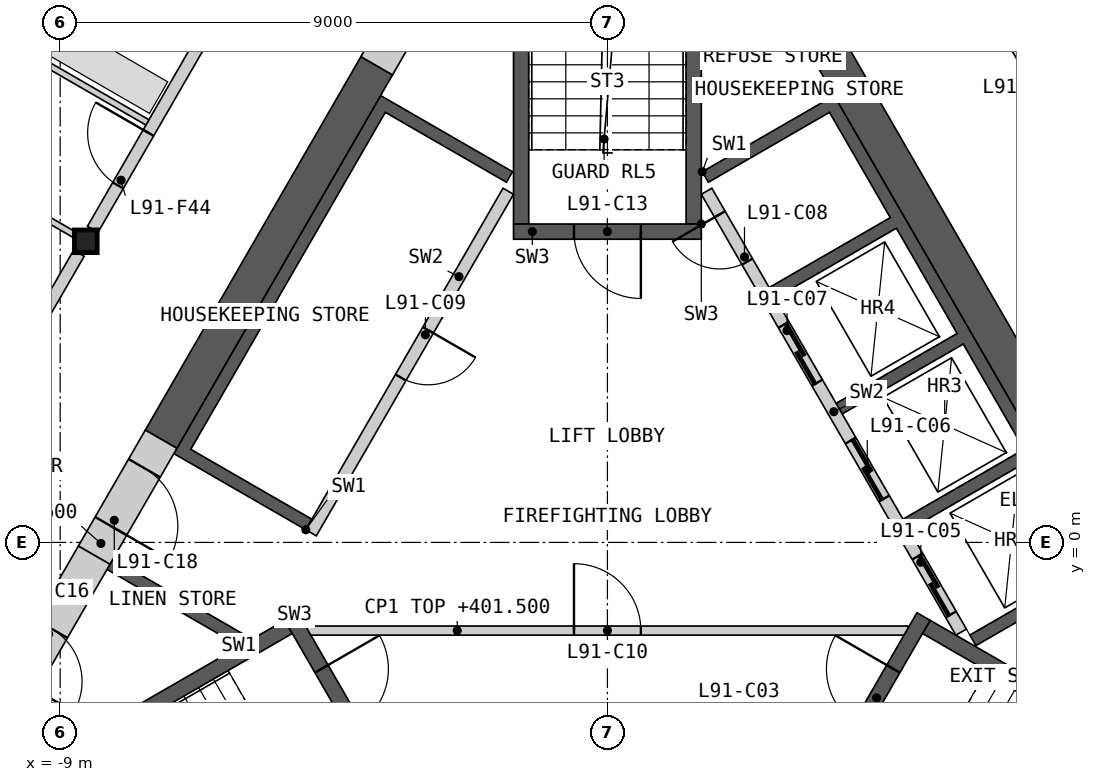
"""IFC4 building model, lengths in metres.
Left out: names, types, materials, properties, quantities, classifications, styles, units other than length and angle.
Written with IfcOpenShell. Run it as: python <this file> out.ifc"""

import sys

from ifc_helpers import new_model, si_unit, direction, frame, frame_2d, origin, origin_2d, place, context, subcontext, project, spatial, polyline, rectangle, i_section, outline, extrude, element, fill, save


model = new_model("IFC4")
c1 = context("Model", 3, precision=1e-05, world=origin(), true_north=direction((0.0, 1.0)))
c2 = subcontext(c1, "Body", "Model", "MODEL_VIEW")
j1 = project(units=[si_unit("LENGTHUNIT", "METRE"), si_unit("PLANEANGLEUNIT", "RADIAN")], contexts=[c1])
p1 = place(None, origin())
s1 = spatial("IfcSite", under=j1, at=p1, CompositionType="ELEMENT")
p2 = place(p1, origin())
s2 = spatial("IfcBuilding", under=s1, at=p2, CompositionType="ELEMENT")
p3 = place(p2, frame((0.0, 0.0, 398.4)))
s3 = spatial("IfcBuildingStorey", under=s2, at=p3, CompositionType="ELEMENT", Elevation=398.4)
p4 = place(p3, frame((-8.578, 4.953, 0.0), z_axis=(0.0, 0.0, 1.0), x_axis=(1.0, 0.0, 0.0)))
e1 = element("IfcColumn", 1, at=p4, inside=s3, PredefinedType="COLUMN", context=c2, shape_type="SweptSolid", body=[
    extrude(i_section(OverallWidth=0.374, OverallDepth=0.372, WebThickness=0.016, FlangeThickness=0.026, at=origin_2d()), origin(), (0.0, 0.0, 1.0), 3.4),
])
p5 = place(p3, origin())
e2 = element("IfcWall", 2, at=p5, inside=s3, PredefinedType="SHEAR", context=c2, shape_type="SweptSolid", body=[
    extrude(outline(polyline([(1.561, 6.097), (3.731, 7.35), (8.231, -0.444), (6.061, -1.697), (5.96, -1.524), (7.952, -0.374), (6.952, 1.358), (4.96, 0.208), (4.861, 0.381), (6.852, 1.531), (5.852, 3.263), (3.861, 2.113), (3.76, 2.287), (5.752, 3.437), (4.752, 5.169), (2.76, 4.019), (2.66, 4.192), (4.652, 5.342), (3.652, 7.074), (1.66, 5.924), (1.561, 6.097)])), origin(), (0.0, 0.0, 1.0), 3.1),
])
p6 = place(p3, frame((5.817, -1.476, 0.0), z_axis=(0.0, 0.0, 1.0), x_axis=(-0.500002616675, 0.866023893041, 0.0)))
e3 = element("IfcWall", 3, at=p6, inside=s3, PredefinedType="SOLIDWALL", context=c2, shape_type="SweptSolid", body=[
    extrude(rectangle(XDim=8.373, YDim=0.2, at=frame_2d((4.187, 0.0))), origin(), (0.0, 0.0, 1.0), 3.1),
])
p7 = place(p6, frame((0.337, 0.0, 0.0)))
e4 = element("IfcOpeningElement", 4, at=p7, cuts=e3, PredefinedType="OPENING", context=c2, shape_type="SweptSolid", body=[
    extrude(rectangle(XDim=1.1, YDim=2.1, at=frame_2d((0.55, 1.05))), frame((0.0, 0.11, 0.0), z_axis=(0.0, -1.0, 0.0), x_axis=(1.0, 0.0, 0.0)), (0.0, 0.0, 1.0), 0.22),
])
p8 = place(p6, frame((2.537, 0.0, 0.0)))
e5 = element("IfcOpeningElement", 5, at=p8, cuts=e3, PredefinedType="OPENING", context=c2, shape_type="SweptSolid", body=[
    extrude(rectangle(XDim=1.1, YDim=2.1, at=frame_2d((0.55, 1.05))), frame((0.0, 0.11, 0.0), z_axis=(0.0, -1.0, 0.0), x_axis=(1.0, 0.0, 0.0)), (0.0, 0.0, 1.0), 0.22),
])
p9 = place(p6, frame((4.737, 0.0, 0.0)))
e6 = element("IfcOpeningElement", 6, at=p9, cuts=e3, PredefinedType="OPENING", context=c2, shape_type="SweptSolid", body=[
    extrude(rectangle(XDim=1.1, YDim=2.1, at=frame_2d((0.55, 1.05))), frame((0.0, 0.11, 0.0), z_axis=(0.0, -1.0, 0.0), x_axis=(1.0, 0.0, 0.0)), (0.0, 0.0, 1.0), 0.22),
])
p10 = place(p6, frame((7.037, 0.0, 0.0)))
e7 = element("IfcOpeningElement", 7, at=p10, cuts=e3, PredefinedType="OPENING", context=c2, shape_type="SweptSolid", body=[
    extrude(rectangle(XDim=0.9, YDim=2.1, at=frame_2d((0.45, 1.05))), frame((0.0, 0.11, 0.0), z_axis=(0.0, -1.0, 0.0), x_axis=(1.0, 0.0, 0.0)), (0.0, 0.0, 1.0), 0.22),
])
p11 = place(p3, origin())
e8 = element("IfcWall", 8, at=p11, inside=s3, PredefinedType="SHEAR", context=c2, shape_type="SweptSolid", body=[
    extrude(outline(polyline([(-6.061, -1.697), (-8.231, -0.444), (-8.131, -0.271), (-5.96, -1.524), (-6.061, -1.697)])), origin(), (0.0, 0.0, 1.0), 3.1),
])
p12 = place(p3, origin())
e9 = element("IfcWall", 9, at=p12, inside=s3, PredefinedType="SHEAR", context=c2, shape_type="SweptSolid", body=[
    extrude(outline(polyline([(-4.96, 0.208), (-7.131, 1.461), (-3.731, 7.35), (-1.561, 6.097), (-1.66, 5.924), (-3.652, 7.074), (-6.852, 1.531), (-4.861, 0.381), (-4.96, 0.208)])), origin(), (0.0, 0.0, 1.0), 3.1),
])
p13 = place(p3, frame((-1.631, 5.776, 0.0), z_axis=(0.0, 0.0, 1.0), x_axis=(-0.499992876559, -0.866029516466, 0.0)))
e10 = element("IfcWall", 10, at=p13, inside=s3, PredefinedType="SOLIDWALL", context=c2, shape_type="SweptSolid", body=[
    extrude(rectangle(XDim=6.486, YDim=0.2, at=frame_2d((3.243, 0.0))), origin(), (0.0, 0.0, 1.0), 3.1),
])
p14 = place(p13, frame((2.637, 0.0, 0.0)))
e11 = element("IfcOpeningElement", 11, at=p14, cuts=e10, PredefinedType="OPENING", context=c2, shape_type="SweptSolid", body=[
    extrude(rectangle(XDim=0.9, YDim=2.1, at=frame_2d((0.45, 1.05))), frame((0.0, 0.11, 0.0), z_axis=(0.0, -1.0, 0.0), x_axis=(1.0, 0.0, 0.0)), (0.0, 0.0, 1.0), 0.22),
])
p15 = place(p3, frame((-4.941, -1.45, 0.0), z_axis=(0.0, 0.0, 1.0), x_axis=(1.0, 0.0, 0.0)))
e12 = element("IfcWall", 12, at=p15, inside=s3, PredefinedType="PARTITIONING", context=c2, shape_type="SweptSolid", body=[
    extrude(rectangle(XDim=9.882, YDim=0.15, at=frame_2d((4.941, 0.0))), origin(), (0.0, 0.0, 1.0), 3.1),
])
p16 = place(p15, frame((4.391, 0.0, 0.0)))
e13 = element("IfcOpeningElement", 13, at=p16, cuts=e12, PredefinedType="OPENING", context=c2, shape_type="SweptSolid", body=[
    extrude(rectangle(XDim=1.1, YDim=2.1, at=frame_2d((0.55, 1.05))), frame((0.0, 0.085, 0.0), z_axis=(0.0, -1.0, 0.0), x_axis=(1.0, 0.0, 0.0)), (0.0, 0.0, 1.0), 0.17),
])
p17 = place(p3, origin())
e14 = element("IfcWall", 14, at=p17, inside=s3, PredefinedType="SHEAR", context=c2, shape_type="SweptSolid", body=[
    extrude(outline(polyline([(-5.307, -1.281), (-10.374, -4.206), (-10.032, -4.298), (-5.182, -1.498), (-5.307, -1.281)])), origin(), (0.0, 0.0, 1.0), 3.1),
])
p18 = place(p3, frame((-5.199, -1.219, 0.0), z_axis=(0.0, 0.0, 1.0), x_axis=(0.499982516597, -0.866035497597, 0.0)))
e15 = element("IfcWall", 15, at=p18, inside=s3, PredefinedType="SHEAR", context=c2, shape_type="SweptSolid", body=[
    extrude(rectangle(XDim=3.088, YDim=0.25, at=frame_2d((1.544, 0.0))), origin(), (0.0, 0.0, 1.0), 3.1),
])
p19 = place(p18, frame((0.994, 0.0, 0.0)))
e16 = element("IfcOpeningElement", 16, at=p19, cuts=e15, PredefinedType="OPENING", context=c2, shape_type="SweptSolid", body=[
    extrude(rectangle(XDim=1.1, YDim=2.1, at=frame_2d((0.55, 1.05))), frame((0.0, 0.135, 0.0), z_axis=(0.0, -1.0, 0.0), x_axis=(1.0, 0.0, 0.0)), (0.0, 0.0, 1.0), 0.27),
])
p20 = place(p3, origin())
e17 = element("IfcWall", 17, at=p20, inside=s3, PredefinedType="SHEAR", context=c2, shape_type="SweptSolid", body=[
    extrude(outline(polyline([(10.032, -4.298), (10.374, -4.206), (5.307, -1.281), (5.182, -1.498), (10.032, -4.298)])), origin(), (0.0, 0.0, 1.0), 3.1),
])
p21 = place(p3, frame((3.655, -3.893, 0.0), z_axis=(0.0, 0.0, 1.0), x_axis=(0.499982516597, 0.866035497597, 0.0)))
e18 = element("IfcWall", 18, at=p21, inside=s3, PredefinedType="SHEAR", context=c2, shape_type="SweptSolid", body=[
    extrude(rectangle(XDim=3.088, YDim=0.25, at=frame_2d((1.544, 0.0))), origin(), (0.0, 0.0, 1.0), 3.1),
])
p22 = place(p21, frame((0.994, 0.0, 0.0)))
e19 = element("IfcOpeningElement", 19, at=p22, cuts=e18, PredefinedType="OPENING", context=c2, shape_type="SweptSolid", body=[
    extrude(rectangle(XDim=1.1, YDim=2.1, at=frame_2d((0.55, 1.05))), frame((0.0, 0.135, 0.0), z_axis=(0.0, -1.0, 0.0), x_axis=(1.0, 0.0, 0.0)), (0.0, 0.0, 1.0), 0.27),
])
p23 = place(p3, origin())
e20 = element("IfcWall", 20, at=p23, inside=s3, PredefinedType="SHEAR", context=c2, shape_type="SweptSolid", body=[
    extrude(outline(polyline([(1.544, 5.237), (1.544, 11.087), (1.294, 10.837), (1.294, 5.237), (1.544, 5.237)])), origin(), (0.0, 0.0, 1.0), 3.1),
])
p24 = place(p3, origin())
e21 = element("IfcWall", 21, at=p24, inside=s3, PredefinedType="SHEAR", context=c2, shape_type="SweptSolid", body=[
    extrude(outline(polyline([(-1.294, 10.837), (-1.544, 11.087), (-1.544, 5.237), (-1.294, 5.237), (-1.294, 10.837)])), origin(), (0.0, 0.0, 1.0), 3.1),
])
p25 = place(p3, frame((1.544, 5.112, 0.0), z_axis=(0.0, 0.0, 1.0), x_axis=(-1.0, 0.0, 0.0)))
e22 = element("IfcWall", 22, at=p25, inside=s3, PredefinedType="SHEAR", context=c2, shape_type="SweptSolid", body=[
    extrude(rectangle(XDim=3.088, YDim=0.25, at=frame_2d((1.544, 0.0))), origin(), (0.0, 0.0, 1.0), 3.1),
])
p26 = place(p25, frame((0.994, 0.0, 0.0)))
e23 = element("IfcOpeningElement", 23, at=p26, cuts=e22, PredefinedType="OPENING", context=c2, shape_type="SweptSolid", body=[
    extrude(rectangle(XDim=1.1, YDim=2.1, at=frame_2d((0.55, 1.05))), frame((0.0, 0.135, 0.0), z_axis=(0.0, -1.0, 0.0), x_axis=(1.0, 0.0, 0.0)), (0.0, 0.0, 1.0), 0.27),
])
p27 = place(p3, frame((8.686, -0.634, 0.0), z_axis=(0.0, 0.0, 1.0), x_axis=(-0.500004601921, 0.866022746848, 0.0)))
e24 = element("IfcWall", 24, at=p27, inside=s3, PredefinedType="SHEAR", context=c2, shape_type="SweptSolid", body=[
    extrude(rectangle(XDim=16.853, YDim=0.6, at=frame_2d((8.426, 0.0))), origin(), (0.0, 0.0, 1.0), 3.1),
])
p28 = place(p3, frame((-3.794, 7.84, 0.0), z_axis=(0.0, 0.0, 1.0), x_axis=(-0.499974747889, -0.866039982607, 0.0)))
e25 = element("IfcWall", 25, at=p28, inside=s3, PredefinedType="SHEAR", context=c2, shape_type="SweptSolid", body=[
    extrude(rectangle(XDim=7.092, YDim=0.6, at=frame_2d((3.546, 0.0))), origin(), (0.0, 0.0, 1.0), 3.1),
])
p29 = place(p3, frame((-8.44, -0.208, 0.0), z_axis=(0.0, 0.0, 1.0), x_axis=(-0.499997052475, -0.866027105532, 0.0)))
e26 = element("IfcWall", 26, at=p29, inside=s3, PredefinedType="SHEAR", context=c2, shape_type="SweptSolid", body=[
    extrude(rectangle(XDim=3.001, YDim=0.6, at=frame_2d((1.501, 0.0))), origin(), (0.0, 0.0, 1.0), 3.1),
])
p30 = place(p29, frame((1.4, 0.0, 0.0)))
e27 = element("IfcOpeningElement", 27, at=p30, cuts=e26, PredefinedType="OPENING", context=c2, shape_type="SweptSolid", body=[
    extrude(rectangle(XDim=1.0, YDim=2.1, at=frame_2d((0.5, 1.05))), frame((0.0, 0.31, 0.0), z_axis=(0.0, -1.0, 0.0), x_axis=(1.0, 0.0, 0.0)), (0.0, 0.0, 1.0), 0.62),
])
p31 = place(p3, frame((-2.694, 9.745, 0.0), z_axis=(0.0, 0.0, 1.0), x_axis=(-0.50002983664, -0.866008176907, 0.0)))
e28 = element("IfcWall", 28, at=p31, inside=s3, PredefinedType="SHEAR", context=c2, shape_type="SweptSolid", body=[
    extrude(rectangle(XDim=2.2, YDim=0.6, at=frame_2d((1.1, 0.0))), origin(), (0.0, 0.0, 1.0), 3.1),
])
p32 = place(p31, frame((0.6, 0.0, 0.0)))
e29 = element("IfcOpeningElement", 29, at=p32, cuts=e28, PredefinedType="OPENING", context=c2, shape_type="SweptSolid", body=[
    extrude(rectangle(XDim=1.0, YDim=2.1, at=frame_2d((0.5, 1.05))), frame((0.0, 0.31, 0.0), z_axis=(0.0, -1.0, 0.0), x_axis=(1.0, 0.0, 0.0)), (0.0, 0.0, 1.0), 0.62),
])
p33 = place(p3, frame((-7.34, 1.698, 0.0), z_axis=(0.0, 0.0, 1.0), x_axis=(-0.50002983664, -0.866008176907, 0.0)))
e30 = element("IfcWall", 30, at=p33, inside=s3, PredefinedType="SHEAR", context=c2, shape_type="SweptSolid", body=[
    extrude(rectangle(XDim=2.2, YDim=0.6, at=frame_2d((1.1, 0.0))), origin(), (0.0, 0.0, 1.0), 3.1),
])
p34 = place(p33, frame((0.55, 0.0, 0.0)))
e31 = element("IfcOpeningElement", 31, at=p34, cuts=e30, PredefinedType="OPENING", context=c2, shape_type="SweptSolid", body=[
    extrude(rectangle(XDim=1.1, YDim=2.1, at=frame_2d((0.55, 1.05))), frame((0.0, 0.31, 0.0), z_axis=(0.0, -1.0, 0.0), x_axis=(1.0, 0.0, 0.0)), (0.0, 0.0, 1.0), 0.62),
])
p35 = place(p3, frame((4.403, 12.185, 0.0), z_axis=(0.0, 0.0, 1.0), x_axis=(0.499992155518, -0.866029932751, 0.0)))
e32 = element("IfcWall", 32, at=p35, inside=s3, PredefinedType="PARTITIONING", context=c2, shape_type="SweptSolid", body=[
    extrude(rectangle(XDim=8.123, YDim=0.2, at=frame_2d((4.062, 0.0))), origin(), (0.0, 0.0, 1.0), 3.1),
])
p36 = place(p35, frame((3.963, 0.0, 0.0)))
e33 = element("IfcOpeningElement", 33, at=p36, cuts=e32, PredefinedType="OPENING", context=c2, shape_type="SweptSolid", body=[
    extrude(rectangle(XDim=1.0, YDim=2.1, at=frame_2d((0.5, 1.05))), frame((0.0, 0.11, 0.0), z_axis=(0.0, -1.0, 0.0), x_axis=(1.0, 0.0, 0.0)), (0.0, 0.0, 1.0), 0.22),
])
p37 = place(p35, frame((1.153, 0.0, 0.0)))
e34 = element("IfcOpeningElement", 34, at=p37, cuts=e32, PredefinedType="OPENING", context=c2, shape_type="SweptSolid", body=[
    extrude(rectangle(XDim=1.0, YDim=2.1, at=frame_2d((0.5, 1.05))), frame((0.0, 0.11, 0.0), z_axis=(0.0, -1.0, 0.0), x_axis=(1.0, 0.0, 0.0)), (0.0, 0.0, 1.0), 0.22),
])
p38 = place(p3, frame((-8.465, 5.15, 0.0), z_axis=(0.0, 0.0, 1.0), x_axis=(0.499992155518, 0.866029932751, 0.0)))
e35 = element("IfcWall", 35, at=p38, inside=s3, PredefinedType="PARTITIONING", context=c2, shape_type="SweptSolid", body=[
    extrude(rectangle(XDim=8.123, YDim=0.2, at=frame_2d((4.062, 0.0))), origin(), (0.0, 0.0, 1.0), 3.1),
])
p39 = place(p38, frame((5.97, 0.0, 0.0)))
e36 = element("IfcOpeningElement", 36, at=p39, cuts=e35, PredefinedType="OPENING", context=c2, shape_type="SweptSolid", body=[
    extrude(rectangle(XDim=1.0, YDim=2.1, at=frame_2d((0.5, 1.05))), frame((0.0, 0.11, 0.0), z_axis=(0.0, -1.0, 0.0), x_axis=(1.0, 0.0, 0.0)), (0.0, 0.0, 1.0), 0.22),
])
p40 = place(p38, frame((0.832, 0.0, 0.0)))
e37 = element("IfcOpeningElement", 37, at=p40, cuts=e35, PredefinedType="OPENING", context=c2, shape_type="SweptSolid", body=[
    extrude(rectangle(XDim=1.0, YDim=2.1, at=frame_2d((0.5, 1.05))), frame((0.0, 0.11, 0.0), z_axis=(0.0, -1.0, 0.0), x_axis=(1.0, 0.0, 0.0)), (0.0, 0.0, 1.0), 0.22),
])
p41 = place(p3, frame((-12.754, -2.279, 0.0), z_axis=(0.0, 0.0, 1.0), x_axis=(0.500001682468, 0.866024432409, 0.0)))
e38 = element("IfcWall", 38, at=p41, inside=s3, PredefinedType="PARTITIONING", context=c2, shape_type="SweptSolid", body=[
    extrude(rectangle(XDim=8.124, YDim=0.2, at=frame_2d((4.062, 0.0))), origin(), (0.0, 0.0, 1.0), 3.1),
])
p42 = place(p3, frame((-18.869, 10.894, 0.0), z_axis=(0.0, 0.0, 1.0), x_axis=(0.866023724155, -0.500002909193, 0.0)))
e39 = element("IfcWall", 39, at=p42, inside=s3, PredefinedType="PARTITIONING", context=c2, shape_type="SweptSolid", body=[
    extrude(rectangle(XDim=11.655, YDim=0.1, at=frame_2d((5.827, 0.0))), origin(), (0.0, 0.0, 1.0), 2.33),
])
p43 = place(p42, frame((6.453, 0.0, 0.0)))
e40 = element("IfcOpeningElement", 40, at=p43, cuts=e39, PredefinedType="OPENING", context=c2, shape_type="SweptSolid", body=[
    extrude(rectangle(XDim=0.95, YDim=2.1, at=frame_2d((0.475, 1.05))), frame((0.0, 0.06, 0.0), z_axis=(0.0, -1.0, 0.0), x_axis=(1.0, 0.0, 0.0)), (0.0, 0.0, 1.0), 0.12),
])
p44 = place(p3, frame((-12.718, 9.883, 0.0), z_axis=(0.0, 0.0, 1.0), x_axis=(0.866017493347, -0.500013701029, 0.0)))
e41 = element("IfcWall", 41, at=p44, inside=s3, PredefinedType="PARTITIONING", context=c2, shape_type="SweptSolid", body=[
    extrude(rectangle(XDim=5.95, YDim=0.1, at=frame_2d((2.975, 0.0))), origin(), (0.0, 0.0, 1.0), 2.33),
])
p45 = place(p7, origin())
e42 = element("IfcDoor", 42, at=p45, inside=s3, OperationType="SLIDING_TO_LEFT", PredefinedType="DOOR", context=c2, shape_type="SweptSolid", body=[
    extrude(rectangle(XDim=1.1, YDim=2.1, at=frame_2d((0.55, 1.05))), frame((0.0, 0.025, 0.0), z_axis=(0.0, -1.0, 0.0), x_axis=(1.0, 0.0, 0.0)), (0.0, 0.0, 1.0), 0.05),
])
fill(e4, e42)
p46 = place(p8, origin())
e43 = element("IfcDoor", 43, at=p46, inside=s3, OperationType="SLIDING_TO_LEFT", PredefinedType="DOOR", context=c2, shape_type="SweptSolid", body=[
    extrude(rectangle(XDim=1.1, YDim=2.1, at=frame_2d((0.55, 1.05))), frame((0.0, 0.025, 0.0), z_axis=(0.0, -1.0, 0.0), x_axis=(1.0, 0.0, 0.0)), (0.0, 0.0, 1.0), 0.05),
])
fill(e5, e43)
p47 = place(p9, origin())
e44 = element("IfcDoor", 44, at=p47, inside=s3, OperationType="SLIDING_TO_LEFT", PredefinedType="DOOR", context=c2, shape_type="SweptSolid", body=[
    extrude(rectangle(XDim=1.1, YDim=2.1, at=frame_2d((0.55, 1.05))), frame((0.0, 0.025, 0.0), z_axis=(0.0, -1.0, 0.0), x_axis=(1.0, 0.0, 0.0)), (0.0, 0.0, 1.0), 0.05),
])
fill(e6, e44)
p48 = place(p10, origin())
e45 = element("IfcDoor", 45, at=p48, inside=s3, OperationType="SINGLE_SWING_RIGHT", PredefinedType="DOOR", context=c2, shape_type="SweptSolid", body=[
    extrude(rectangle(XDim=0.9, YDim=2.1, at=frame_2d((0.45, 1.05))), frame((0.0, 0.025, 0.0), z_axis=(0.0, -1.0, 0.0), x_axis=(1.0, 0.0, 0.0)), (0.0, 0.0, 1.0), 0.05),
])
fill(e7, e45)
p49 = place(p14, origin())
e46 = element("IfcDoor", 46, at=p49, inside=s3, OperationType="SINGLE_SWING_LEFT", PredefinedType="DOOR", context=c2, shape_type="SweptSolid", body=[
    extrude(rectangle(XDim=0.9, YDim=2.1, at=frame_2d((0.45, 1.05))), frame((0.0, 0.025, 0.0), z_axis=(0.0, -1.0, 0.0), x_axis=(1.0, 0.0, 0.0)), (0.0, 0.0, 1.0), 0.05),
])
fill(e11, e46)
p50 = place(p16, origin())
e47 = element("IfcDoor", 47, at=p50, inside=s3, OperationType="SINGLE_SWING_LEFT", PredefinedType="DOOR", context=c2, shape_type="SweptSolid", body=[
    extrude(rectangle(XDim=1.1, YDim=2.1, at=frame_2d((0.55, 1.05))), frame((0.0, 0.025, 0.0), z_axis=(0.0, -1.0, 0.0), x_axis=(1.0, 0.0, 0.0)), (0.0, 0.0, 1.0), 0.05),
])
fill(e13, e47)
p51 = place(p19, origin())
e48 = element("IfcDoor", 48, at=p51, inside=s3, OperationType="SINGLE_SWING_LEFT", PredefinedType="DOOR", context=c2, shape_type="SweptSolid", body=[
    extrude(rectangle(XDim=1.1, YDim=2.1, at=frame_2d((0.55, 1.05))), frame((0.0, 0.025, 0.0), z_axis=(0.0, -1.0, 0.0), x_axis=(1.0, 0.0, 0.0)), (0.0, 0.0, 1.0), 0.05),
])
fill(e16, e48)
p52 = place(p22, origin())
e49 = element("IfcDoor", 49, at=p52, inside=s3, OperationType="SINGLE_SWING_RIGHT", PredefinedType="DOOR", context=c2, shape_type="SweptSolid", body=[
    extrude(rectangle(XDim=1.1, YDim=2.1, at=frame_2d((0.55, 1.05))), frame((0.0, 0.025, 0.0), z_axis=(0.0, -1.0, 0.0), x_axis=(1.0, 0.0, 0.0)), (0.0, 0.0, 1.0), 0.05),
])
fill(e19, e49)
p53 = place(p26, origin())
e50 = element("IfcDoor", 50, at=p53, inside=s3, OperationType="SINGLE_SWING_LEFT", PredefinedType="DOOR", context=c2, shape_type="SweptSolid", body=[
    extrude(rectangle(XDim=1.1, YDim=2.1, at=frame_2d((0.55, 1.05))), frame((0.0, 0.025, 0.0), z_axis=(0.0, -1.0, 0.0), x_axis=(1.0, 0.0, 0.0)), (0.0, 0.0, 1.0), 0.05),
])
fill(e23, e50)
p54 = place(p30, origin())
e51 = element("IfcDoor", 51, at=p54, inside=s3, OperationType="SINGLE_SWING_RIGHT", PredefinedType="DOOR", context=c2, shape_type="SweptSolid", body=[
    extrude(rectangle(XDim=1.0, YDim=2.1, at=frame_2d((0.5, 1.05))), frame((0.0, 0.055, 0.0), z_axis=(0.0, -1.0, 0.0), x_axis=(1.0, 0.0, 0.0)), (0.0, 0.0, 1.0), 0.05),
])
fill(e27, e51)
p55 = place(p34, origin())
e52 = element("IfcDoor", 52, at=p55, inside=s3, OperationType="SINGLE_SWING_RIGHT", PredefinedType="DOOR", context=c2, shape_type="SweptSolid", body=[
    extrude(rectangle(XDim=1.1, YDim=2.1, at=frame_2d((0.55, 1.05))), frame((0.0, 0.055, 0.0), z_axis=(0.0, -1.0, 0.0), x_axis=(1.0, 0.0, 0.0)), (0.0, 0.0, 1.0), 0.05),
])
fill(e31, e52)
p56 = place(p36, origin())
e53 = element("IfcDoor", 53, at=p56, inside=s3, OperationType="SINGLE_SWING_LEFT", PredefinedType="DOOR", context=c2, shape_type="SweptSolid", body=[
    extrude(rectangle(XDim=1.0, YDim=2.1, at=frame_2d((0.5, 1.05))), frame((0.0, 0.025, 0.0), z_axis=(0.0, -1.0, 0.0), x_axis=(1.0, 0.0, 0.0)), (0.0, 0.0, 1.0), 0.05),
])
fill(e33, e53)
p57 = place(p40, origin())
e54 = element("IfcDoor", 54, at=p57, inside=s3, OperationType="SINGLE_SWING_RIGHT", PredefinedType="DOOR", context=c2, shape_type="SweptSolid", body=[
    extrude(rectangle(XDim=1.0, YDim=2.1, at=frame_2d((0.5, 1.05))), frame((0.0, 0.025, 0.0), z_axis=(0.0, -1.0, 0.0), x_axis=(1.0, 0.0, 0.0)), (0.0, 0.0, 1.0), 0.05),
])
fill(e37, e54)
save(model, sys.argv[1])
